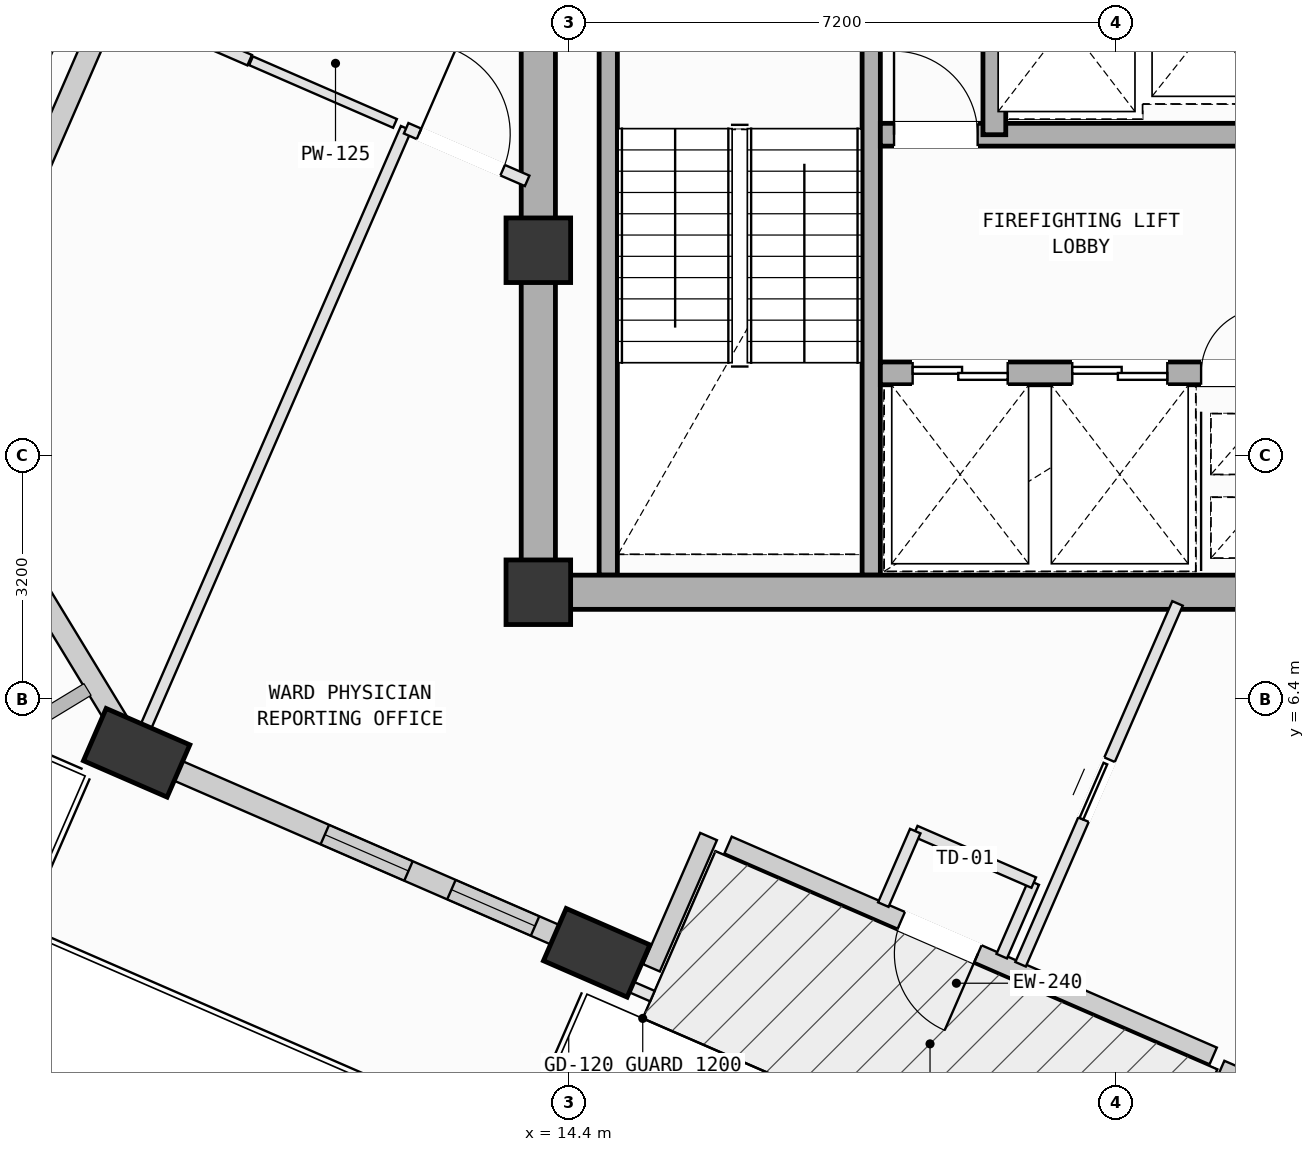
"""IFC4 building model, lengths in metres.
Left out: names, types, materials, properties, quantities, classifications, styles, units other than length and angle.
Written with IfcOpenShell. Run it as: python <this file> out.ifc"""

import sys

from ifc_helpers import new_model, si_unit, direction, frame, frame_2d, origin, origin_2d, place, context, subcontext, project, spatial, rectangle, extrude, element, fill, save


model = new_model("IFC4")
c1 = context("Model", 3, precision=1e-05, world=origin(), true_north=direction((0.0, 1.0)))
c2 = subcontext(c1, "Body", "Model", "MODEL_VIEW")
j1 = project(units=[si_unit("LENGTHUNIT", "METRE"), si_unit("PLANEANGLEUNIT", "RADIAN")], contexts=[c1])
p1 = place(None, origin())
s1 = spatial("IfcSite", under=j1, at=p1, CompositionType="ELEMENT")
p2 = place(p1, origin())
s2 = spatial("IfcBuilding", under=s1, at=p2, CompositionType="ELEMENT")
p3 = place(p2, frame((0.0, 0.0, 316.6)))
s3 = spatial("IfcBuildingStorey", under=s2, at=p3, CompositionType="ELEMENT", Elevation=316.6)
for number, where, z_axis, x_axis in (
    (1, (14.0, 7.8, 0.0), (0.0, 0.0, 1.0), (1.0, 0.0, 0.0)),
    (2, (14.0, 12.3, 0.0), (0.0, 0.0, 1.0), (1.0, 0.0, 0.0)),
):
    element("IfcColumn", number, at=place(p3, frame(where, z_axis=z_axis, x_axis=x_axis)), inside=s3, PredefinedType="COLUMN", context=c2, shape_type="SweptSolid", body=[
        extrude(rectangle(XDim=0.85, YDim=0.85, at=origin_2d()), origin(), (0.0, 0.0, 1.0), 4.0),
    ])
for number, where, z_axis, x_axis in (
    (3, (8.715, 5.688, 0.002), (0.0, 0.0, 1.0), (-0.917, 0.399, 0.0)),
    (4, (14.768, 3.056, 0.002), (0.0, 0.0, 1.0), (-0.917, 0.399, 0.0)),
):
    element("IfcColumn", number, at=place(p3, frame(where, z_axis=z_axis, x_axis=x_axis)), inside=s3, PredefinedType="COLUMN", context=c2, shape_type="SweptSolid", body=[
        extrude(rectangle(XDim=1.2, YDim=0.75, at=origin_2d()), origin(), (0.0, 0.0, 1.0), 3.996),
    ])
p4 = place(p3, frame((22.879, 1.699, 0.0), z_axis=(0.0, 0.0, 1.0), x_axis=(-0.917069498579, 0.398727394062, 0.0)))
e5 = element("IfcWall", 5, at=p4, inside=s3, PredefinedType="SOLIDWALL", context=c2, shape_type="SweptSolid", body=[
    extrude(rectangle(XDim=6.96, YDim=0.24, at=frame_2d((3.48, 0.0))), origin(), (0.0, 0.0, 1.0), 3.265),
])
p5 = place(p4, frame((3.375, 0.0, 0.0)))
e6 = element("IfcOpeningElement", 6, at=p5, cuts=e5, PredefinedType="OPENING", context=c2, shape_type="SweptSolid", body=[
    extrude(rectangle(XDim=1.1, YDim=2.15, at=frame_2d((0.55, 1.075))), frame((0.0, 0.13, 0.0), z_axis=(0.0, -1.0, 0.0), x_axis=(1.0, 0.0, 0.0)), (0.0, 0.0, 1.0), 0.26),
])
p6 = place(p3, frame((22.139, -0.705, 0.0), z_axis=(0.0, 0.0, 1.0), x_axis=(0.398758251475, 0.917056081644, 0.0)))
e7 = element("IfcWall", 7, at=p6, inside=s3, PredefinedType="SOLIDWALL", context=c2, shape_type="SweptSolid", body=[
    extrude(rectangle(XDim=2.5, YDim=0.24, at=frame_2d((1.25, 0.0))), origin(), (0.0, 0.0, 1.0), 3.265),
])
p7 = place(p3, frame((16.24, 4.586, 0.0), z_axis=(0.0, 0.0, 1.0), x_axis=(-0.398730849785, -0.917067996077, 0.0)))
e8 = element("IfcWall", 8, at=p7, inside=s3, PredefinedType="SOLIDWALL", context=c2, shape_type="SweptSolid", body=[
    extrude(rectangle(XDim=1.884, YDim=0.24, at=frame_2d((0.942, 0.0))), origin(), (0.0, 0.0, 1.0), 3.265),
])
p8 = place(p3, frame((6.172, 10.498, 0.0), z_axis=(0.0, 0.0, 1.0), x_axis=(0.398740578379, 0.917063766133, 0.0)))
e9 = element("IfcWall", 9, at=p8, inside=s3, PredefinedType="SOLIDWALL", context=c2, shape_type="SweptSolid", body=[
    extrude(rectangle(XDim=7.405, YDim=0.28, at=frame_2d((3.702, 0.0))), origin(), (0.0, 0.0, 1.0), 3.265),
])
p9 = place(p3, frame((8.509, 6.027, 0.0), z_axis=(0.0, 0.0, 1.0), x_axis=(-0.51924554751, 0.854625099907, 0.0)))
e10 = element("IfcWall", 10, at=p9, inside=s3, PredefinedType="SOLIDWALL", context=c2, shape_type="SweptSolid", body=[
    extrude(rectangle(XDim=4.407, YDim=0.28, at=frame_2d((2.204, 0.0))), origin(), (0.0, 0.0, 1.0), 3.265),
])
p10 = place(p3, frame((14.403, 3.215, 0.0), z_axis=(0.0, 0.0, 1.0), x_axis=(-0.917061363729, 0.398746103624, 0.0)))
e11 = element("IfcWall", 11, at=p10, inside=s3, PredefinedType="SOLIDWALL", context=c2, shape_type="SweptSolid", body=[
    extrude(rectangle(XDim=5.805, YDim=0.28, at=frame_2d((2.902, 0.0))), origin(), (0.0, 0.0, 1.0), 3.265),
])
p11 = place(p10, frame((2.302, 0.0, 0.75)))
e12 = element("IfcOpeningElement", 12, at=p11, cuts=e11, PredefinedType="OPENING", context=c2, shape_type="SweptSolid", body=[
    extrude(rectangle(XDim=1.2, YDim=1.75, at=frame_2d((0.6, 0.875))), frame((0.0, 0.15, 0.0), z_axis=(0.0, -1.0, 0.0), x_axis=(1.0, 0.0, 0.0)), (0.0, 0.0, 1.0), 0.3),
])
p12 = place(p10, frame((0.486, 0.0, 0.75)))
e13 = element("IfcOpeningElement", 13, at=p12, cuts=e11, PredefinedType="OPENING", context=c2, shape_type="SweptSolid", body=[
    extrude(rectangle(XDim=1.2, YDim=1.75, at=frame_2d((0.6, 0.875))), frame((0.0, 0.15, 0.0), z_axis=(0.0, -1.0, 0.0), x_axis=(1.0, 0.0, 0.0)), (0.0, 0.0, 1.0), 0.3),
])
for number, where, z_axis, x_axis in (
    (14, (18.38, 15.12, 0.0), (0.0, 0.0, 1.0), (0.0, -1.0, 0.0)),
    (15, (14.92, 8.025, 0.0), (0.0, 0.0, 1.0), (0.0, 1.0, 0.0)),
):
    element("IfcWall", number, at=place(p3, frame(where, z_axis=z_axis, x_axis=x_axis)), inside=s3, PredefinedType="SOLIDWALL", context=c2, shape_type="SweptSolid", body=[
        extrude(rectangle(XDim=7.095, YDim=0.24, at=frame_2d((3.548, 0.0))), origin(), (0.0, 0.0, 1.0), 3.78),
    ])
p13 = place(p3, frame((14.0, 7.8, 0.0), z_axis=(0.0, 0.0, 1.0), x_axis=(1.0, 0.0, 0.0)))
e16 = element("IfcWall", 16, at=p13, inside=s3, PredefinedType="SHEAR", context=c2, shape_type="SweptSolid", body=[
    extrude(rectangle(XDim=10.8, YDim=0.45, at=frame_2d((5.4, 0.0))), origin(), (0.0, 0.0, 1.0), 3.78),
])
p14 = place(p3, frame((14.0, 16.8, 0.0), z_axis=(0.0, 0.0, 1.0), x_axis=(0.0, -1.0, 0.0)))
e17 = element("IfcWall", 17, at=p14, inside=s3, PredefinedType="SHEAR", context=c2, shape_type="SweptSolid", body=[
    extrude(rectangle(XDim=9.0, YDim=0.45, at=frame_2d((4.5, 0.0))), origin(), (0.0, 0.0, 1.0), 3.78),
])
p15 = place(p3, frame((18.5, 10.68, 0.0), z_axis=(0.0, 0.0, 1.0), x_axis=(1.0, 0.0, 0.0)))
e18 = element("IfcWall", 18, at=p15, inside=s3, PredefinedType="SOLIDWALL", context=c2, shape_type="SweptSolid", body=[
    extrude(rectangle(XDim=5.3, YDim=0.3, at=frame_2d((2.65, 0.0))), origin(), (0.0, 0.0, 1.0), 3.78),
])
p16 = place(p15, frame((4.22, 0.0, 0.0)))
e19 = element("IfcOpeningElement", 19, at=p16, cuts=e18, PredefinedType="OPENING", context=c2, shape_type="SweptSolid", body=[
    extrude(rectangle(XDim=0.86, YDim=2.06, at=frame_2d((0.43, 1.03))), frame((0.0, 0.16, 0.0), z_axis=(0.0, -1.0, 0.0), x_axis=(1.0, 0.0, 0.0)), (0.0, 0.0, 1.0), 0.32),
])
p17 = place(p15, frame((0.425, 0.0, 0.0)))
e20 = element("IfcOpeningElement", 20, at=p17, cuts=e18, PredefinedType="OPENING", context=c2, shape_type="SweptSolid", body=[
    extrude(rectangle(XDim=1.25, YDim=2.18, at=frame_2d((0.625, 1.09))), frame((0.0, 0.16, 0.0), z_axis=(0.0, -1.0, 0.0), x_axis=(1.0, 0.0, 0.0)), (0.0, 0.0, 1.0), 0.32),
])
p18 = place(p15, frame((2.525, 0.0, 0.0)))
e21 = element("IfcOpeningElement", 21, at=p18, cuts=e18, PredefinedType="OPENING", context=c2, shape_type="SweptSolid", body=[
    extrude(rectangle(XDim=1.25, YDim=2.18, at=frame_2d((0.625, 1.09))), frame((0.0, 0.16, 0.0), z_axis=(0.0, -1.0, 0.0), x_axis=(1.0, 0.0, 0.0)), (0.0, 0.0, 1.0), 0.32),
])
p19 = place(p3, frame((18.5, 13.82, 0.0), z_axis=(0.0, 0.0, 1.0), x_axis=(1.0, 0.0, 0.0)))
e22 = element("IfcWall", 22, at=p19, inside=s3, PredefinedType="SOLIDWALL", context=c2, shape_type="SweptSolid", body=[
    extrude(rectangle(XDim=5.3, YDim=0.3, at=frame_2d((2.65, 0.0))), origin(), (0.0, 0.0, 1.0), 3.78),
])
p20 = place(p19, frame((0.18, 0.0, 0.0)))
e23 = element("IfcOpeningElement", 23, at=p20, cuts=e22, PredefinedType="OPENING", context=c2, shape_type="SweptSolid", body=[
    extrude(rectangle(XDim=1.1, YDim=2.15, at=frame_2d((0.55, 1.075))), frame((0.0, 0.16, 0.0), z_axis=(0.0, -1.0, 0.0), x_axis=(1.0, 0.0, 0.0)), (0.0, 0.0, 1.0), 0.32),
])
p21 = place(p3, frame((20.0, 13.82, 0.0), z_axis=(0.0, 0.0, 1.0), x_axis=(0.0, 1.0, 0.0)))
e24 = element("IfcWall", 24, at=p21, inside=s3, PredefinedType="SOLIDWALL", context=c2, shape_type="SweptSolid", body=[
    extrude(rectangle(XDim=2.73, YDim=0.3, at=frame_2d((1.365, 0.0))), origin(), (0.0, 0.0, 1.0), 3.78),
])
p22 = place(p3, frame((20.345, 2.905, 0.0), z_axis=(0.0, 0.0, 1.0), x_axis=(0.398819215719, 0.917029570501, 0.0)))
e25 = element("IfcWall", 25, at=p22, inside=s3, PredefinedType="PARTITIONING", context=c2, shape_type="SweptSolid", body=[
    extrude(rectangle(XDim=5.178, YDim=0.15, at=frame_2d((2.589, 0.0))), origin(), (0.0, 0.0, 1.0), 3.78),
])
p23 = place(p22, frame((2.075, 0.0, 0.0)))
e26 = element("IfcOpeningElement", 26, at=p23, cuts=e25, PredefinedType="OPENING", context=c2, shape_type="SweptSolid", body=[
    extrude(rectangle(XDim=0.86, YDim=2.06, at=frame_2d((0.43, 1.03))), frame((0.0, 0.085, 0.0), z_axis=(0.0, -1.0, 0.0), x_axis=(1.0, 0.0, 0.0)), (0.0, 0.0, 1.0), 0.17),
])
p24 = place(p3, frame((20.097, 3.012, 0.0), z_axis=(0.0, 0.0, 1.0), x_axis=(0.398937514446, 0.916978112916, 0.0)))
e27 = element("IfcWall", 27, at=p24, inside=s3, PredefinedType="PARTITIONING", context=c2, shape_type="SweptSolid", body=[
    extrude(rectangle(XDim=1.056, YDim=0.15, at=frame_2d((0.528, 0.0))), origin(), (0.0, 0.0, 1.0), 3.78),
])
p25 = place(p3, frame((20.518, 3.98, 0.0), z_axis=(0.0, 0.0, 1.0), x_axis=(-0.917254925113, 0.398300643178, 0.0)))
e28 = element("IfcWall", 28, at=p25, inside=s3, PredefinedType="PARTITIONING", context=c2, shape_type="SweptSolid", body=[
    extrude(rectangle(XDim=1.7, YDim=0.15, at=frame_2d((0.85, 0.0))), origin(), (0.0, 0.0, 1.0), 3.415),
])
p26 = place(p3, frame((18.959, 4.657, 0.0), z_axis=(0.0, 0.0, 1.0), x_axis=(-0.398302687318, -0.917254037481, 0.0)))
e29 = element("IfcWall", 29, at=p26, inside=s3, PredefinedType="PARTITIONING", context=c2, shape_type="SweptSolid", body=[
    extrude(rectangle(XDim=1.054, YDim=0.15, at=frame_2d((0.527, 0.0))), origin(), (0.0, 0.0, 1.0), 3.78),
])
p27 = place(p3, frame((15.501, 2.486, 0.0), z_axis=(0.0, 0.0, 1.0), x_axis=(-0.91721659354, 0.39838890614, 0.0)))
e30 = element("IfcWall", 30, at=p27, inside=s3, PredefinedType="PARTITIONING", context=c2, shape_type="SweptSolid", body=[
    extrude(rectangle(XDim=1.297, YDim=0.15, at=frame_2d((0.649, 0.0))), origin(), (0.0, 0.0, 1.0), 3.265),
])
p28 = place(p3, frame((8.988, 5.318, 0.0), z_axis=(0.0, 0.0, 1.0), x_axis=(-0.916831392251, 0.399274589954, 0.0)))
e31 = element("IfcWall", 31, at=p28, inside=s3, PredefinedType="PARTITIONING", context=c2, shape_type="SweptSolid", body=[
    extrude(rectangle(XDim=0.423, YDim=0.15, at=frame_2d((0.211, 0.0))), origin(), (0.0, 0.0, 1.0), 3.265),
])
p29 = place(p3, frame((8.6, 5.487, 0.0), z_axis=(0.0, 0.0, 1.0), x_axis=(0.398808773401, 0.917034111829, 0.0)))
e32 = element("IfcWall", 32, at=p29, inside=s3, PredefinedType="PARTITIONING", context=c2, shape_type="SweptSolid", body=[
    extrude(rectangle(XDim=9.179, YDim=0.15, at=frame_2d((4.59, 0.0))), origin(), (0.0, 0.0, 1.0), 3.78),
])
p30 = place(p3, frame((12.261, 13.905, 0.0), z_axis=(0.0, 0.0, 1.0), x_axis=(0.91708123515, -0.398700398965, 0.0)))
e33 = element("IfcWall", 33, at=p30, inside=s3, PredefinedType="PARTITIONING", context=c2, shape_type="SweptSolid", body=[
    extrude(rectangle(XDim=1.736, YDim=0.15, at=frame_2d((0.868, 0.0))), origin(), (0.0, 0.0, 1.0), 3.78),
])
p31 = place(p30, frame((0.184, 0.0, 0.0)))
e34 = element("IfcOpeningElement", 34, at=p31, cuts=e33, PredefinedType="OPENING", context=c2, shape_type="SweptSolid", body=[
    extrude(rectangle(XDim=1.2, YDim=2.15, at=frame_2d((0.6, 1.075))), frame((0.0, 0.085, 0.0), z_axis=(0.0, -1.0, 0.0), x_axis=(1.0, 0.0, 0.0)), (0.0, 0.0, 1.0), 0.17),
])
p32 = place(p3, frame((8.492, 15.544, 0.0), z_axis=(0.0, 0.0, 1.0), x_axis=(0.917176199692, -0.398481892585, 0.0)))
e35 = element("IfcWall", 35, at=p32, inside=s3, PredefinedType="PARTITIONING", context=c2, shape_type="SweptSolid", body=[
    extrude(rectangle(XDim=1.864, YDim=0.15, at=frame_2d((0.932, 0.0))), origin(), (0.0, 0.0, 1.0), 3.78),
])
p33 = place(p3, frame((10.22, 14.793, 0.0), z_axis=(0.0, 0.0, 1.0), x_axis=(0.916985473765, -0.398920594735, 0.0)))
e36 = element("IfcWall", 36, at=p33, inside=s3, PredefinedType="PARTITIONING", context=c2, shape_type="SweptSolid", body=[
    extrude(rectangle(XDim=2.065, YDim=0.125, at=frame_2d((1.033, 0.0))), origin(), (0.0, 0.0, 1.0), 3.78),
])
p34 = place(p3, frame((5.828, 11.01, 0.0), z_axis=(0.0, 0.0, 1.0), x_axis=(0.398767783479, 0.917051936838, 0.0)))
e37 = element("IfcWall", 37, at=p34, inside=s3, PredefinedType="PARTITIONING", context=c2, shape_type="SweptSolid", body=[
    extrude(rectangle(XDim=6.641, YDim=0.15, at=frame_2d((3.32, 0.0))), origin(), (0.0, 0.0, 1.0), 3.78),
])
p35 = place(p5, origin())
e38 = element("IfcDoor", 38, at=p35, inside=s3, OperationType="SINGLE_SWING_LEFT", PredefinedType="DOOR", context=c2, shape_type="SweptSolid", body=[
    extrude(rectangle(XDim=1.1, YDim=2.15, at=frame_2d((0.55, 1.075))), frame((0.0, 0.025, 0.0), z_axis=(0.0, -1.0, 0.0), x_axis=(1.0, 0.0, 0.0)), (0.0, 0.0, 1.0), 0.05),
])
fill(e6, e38)
p36 = place(p11, origin())
e39 = element("IfcWindow", 39, at=p36, inside=s3, PartitioningType="SINGLE_PANEL", PredefinedType="WINDOW", context=c2, shape_type="SweptSolid", body=[
    extrude(rectangle(XDim=1.2, YDim=1.75, at=frame_2d((0.6, 0.875))), frame((0.0, 0.03, 0.0), z_axis=(0.0, -1.0, 0.0), x_axis=(1.0, 0.0, 0.0)), (0.0, 0.0, 1.0), 0.06),
])
fill(e12, e39)
p37 = place(p12, origin())
e40 = element("IfcWindow", 40, at=p37, inside=s3, PartitioningType="SINGLE_PANEL", PredefinedType="WINDOW", context=c2, shape_type="SweptSolid", body=[
    extrude(rectangle(XDim=1.2, YDim=1.75, at=frame_2d((0.6, 0.875))), frame((0.0, 0.03, 0.0), z_axis=(0.0, -1.0, 0.0), x_axis=(1.0, 0.0, 0.0)), (0.0, 0.0, 1.0), 0.06),
])
fill(e13, e40)
p38 = place(p16, origin())
e41 = element("IfcDoor", 41, at=p38, inside=s3, OperationType="SINGLE_SWING_RIGHT", PredefinedType="DOOR", context=c2, shape_type="SweptSolid", body=[
    extrude(rectangle(XDim=0.86, YDim=2.06, at=frame_2d((0.43, 1.03))), frame((0.0, 0.025, 0.0), z_axis=(0.0, -1.0, 0.0), x_axis=(1.0, 0.0, 0.0)), (0.0, 0.0, 1.0), 0.05),
])
fill(e19, e41)
p39 = place(p20, origin())
e42 = element("IfcDoor", 42, at=p39, inside=s3, OperationType="SINGLE_SWING_LEFT", PredefinedType="DOOR", context=c2, shape_type="SweptSolid", body=[
    extrude(rectangle(XDim=1.1, YDim=2.15, at=frame_2d((0.55, 1.075))), frame((0.0, 0.025, 0.0), z_axis=(0.0, -1.0, 0.0), x_axis=(1.0, 0.0, 0.0)), (0.0, 0.0, 1.0), 0.05),
])
fill(e23, e42)
p40 = place(p17, origin())
e43 = element("IfcDoor", 43, at=p40, inside=s3, OperationType="DOUBLE_DOOR_SLIDING", PredefinedType="DOOR", context=c2, shape_type="SweptSolid", body=[
    extrude(rectangle(XDim=1.25, YDim=2.18, at=frame_2d((0.625, 1.09))), frame((0.0, 0.025, 0.0), z_axis=(0.0, -1.0, 0.0), x_axis=(1.0, 0.0, 0.0)), (0.0, 0.0, 1.0), 0.05),
])
fill(e20, e43)
p41 = place(p18, origin())
e44 = element("IfcDoor", 44, at=p41, inside=s3, OperationType="DOUBLE_DOOR_SLIDING", PredefinedType="DOOR", context=c2, shape_type="SweptSolid", body=[
    extrude(rectangle(XDim=1.25, YDim=2.18, at=frame_2d((0.625, 1.09))), frame((0.0, 0.025, 0.0), z_axis=(0.0, -1.0, 0.0), x_axis=(1.0, 0.0, 0.0)), (0.0, 0.0, 1.0), 0.05),
])
fill(e21, e44)
p42 = place(p31, origin())
e45 = element("IfcDoor", 45, at=p42, inside=s3, OperationType="SINGLE_SWING_LEFT", PredefinedType="DOOR", context=c2, shape_type="SweptSolid", body=[
    extrude(rectangle(XDim=1.2, YDim=2.15, at=frame_2d((0.6, 1.075))), frame((0.0, 0.025, 0.0), z_axis=(0.0, -1.0, 0.0), x_axis=(1.0, 0.0, 0.0)), (0.0, 0.0, 1.0), 0.05),
])
fill(e34, e45)
p43 = place(p23, origin())
e46 = element("IfcDoor", 46, at=p43, inside=s3, OperationType="SLIDING_TO_LEFT", PredefinedType="DOOR", context=c2, shape_type="SweptSolid", body=[
    extrude(rectangle(XDim=0.86, YDim=2.06, at=frame_2d((0.43, 1.03))), frame((0.0, 0.025, 0.0), z_axis=(0.0, -1.0, 0.0), x_axis=(1.0, 0.0, 0.0)), (0.0, 0.0, 1.0), 0.05),
])
fill(e26, e46)
save(model, sys.argv[1])
